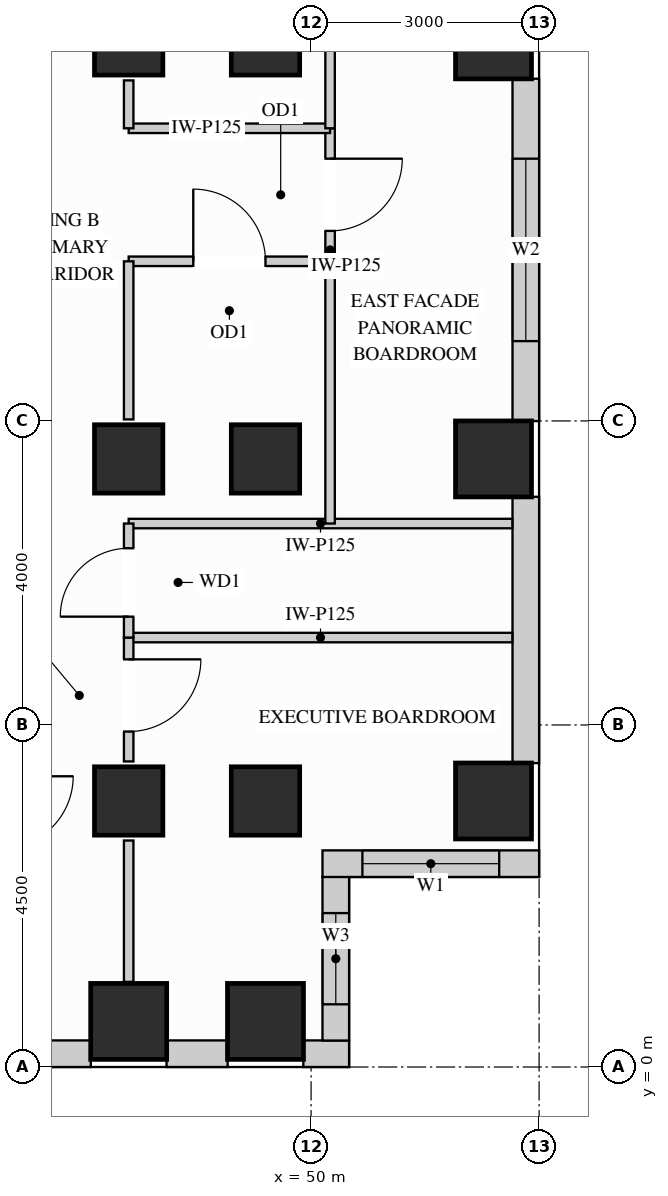
"""IFC4 building model, lengths in metres.
Left out: names, types, materials, properties, quantities, classifications, styles, units other than length and angle.
Written with IfcOpenShell. Run it as: python <this file> out.ifc"""

import sys

from ifc_helpers import new_model, si_unit, direction, frame, frame_2d, origin, origin_2d, place, context, subcontext, project, spatial, rectangle, extrude, source, transform, mapped, element, fill, save


model = new_model("IFC4")
c1 = context("Model", 3, precision=1e-05, world=origin(), true_north=direction((0.0, 1.0)))
c2 = subcontext(c1, "Body", "Model", "MODEL_VIEW")
j1 = project(units=[si_unit("LENGTHUNIT", "METRE"), si_unit("PLANEANGLEUNIT", "RADIAN")], contexts=[c1])
p1 = place(None, origin())
s1 = spatial("IfcSite", under=j1, at=p1, CompositionType="ELEMENT")
p2 = place(p1, origin())
s2 = spatial("IfcBuilding", under=s1, at=p2, CompositionType="ELEMENT")
p3 = place(p2, frame((0.0, 0.0, 171.9)))
s3 = spatial("IfcBuildingStorey", under=s2, at=p3, CompositionType="ELEMENT", Elevation=171.9)
m1 = source(origin(), c2, "Body", "SweptSolid", [
    extrude(rectangle(XDim=0.9, YDim=0.9, at=origin_2d()), origin(), (0.0, 0.0, 1.0), 3.4),
])
for number, where, z_axis, x_axis in (
    (1, (47.6, 13.5, 0.0), (0.0, 0.0, 1.0), (1.0, 0.0, 0.0)),
    (2, (47.6, 3.5, 0.0), (0.0, 0.0, 1.0), (1.0, 0.0, 0.0)),
    (3, (47.6, 8.0, 0.0), (0.0, 0.0, 1.0), (1.0, 0.0, 0.0)),
    (4, (49.4, 13.5, 0.0), (0.0, 0.0, 1.0), (1.0, 0.0, 0.0)),
    (5, (49.4, 3.5, 0.0), (0.0, 0.0, 1.0), (1.0, 0.0, 0.0)),
    (6, (49.4, 8.0, 0.0), (0.0, 0.0, 1.0), (1.0, 0.0, 0.0)),
):
    element("IfcColumn", number, at=place(p3, frame(where, z_axis=z_axis, x_axis=x_axis)), inside=s3, PredefinedType="COLUMN", context=c2, shape_type="MappedRepresentation", body=[
        mapped(m1, transform((0.0, 0.0, 0.0), x_axis=(1.0, 0.0, 0.0), y_axis=(0.0, 1.0, 0.0), z_axis=(0.0, 0.0, 1.0))),
    ])
m2 = source(origin(), c2, "Body", "SweptSolid", [
    extrude(rectangle(XDim=1.0, YDim=1.0, at=origin_2d()), origin(), (0.0, 0.0, 1.0), 3.4),
])
for number, where, z_axis, x_axis in (
    (7, (52.4, 13.5, 0.0), (0.0, 0.0, 1.0), (1.0, 0.0, 0.0)),
    (8, (52.4, 3.5, 0.0), (0.0, 0.0, 1.0), (1.0, 0.0, 0.0)),
    (9, (52.4, 8.0, 0.0), (0.0, 0.0, 1.0), (1.0, 0.0, 0.0)),
    (10, (47.6, 0.6, 0.0), (0.0, 0.0, 1.0), (1.0, 0.0, 0.0)),
    (11, (49.4, 0.6, 0.0), (0.0, 0.0, 1.0), (1.0, 0.0, 0.0)),
):
    element("IfcColumn", number, at=place(p3, frame(where, z_axis=z_axis, x_axis=x_axis)), inside=s3, PredefinedType="COLUMN", context=c2, shape_type="MappedRepresentation", body=[
        mapped(m2, transform((0.0, 0.0, 0.0), x_axis=(1.0, 0.0, 0.0), y_axis=(0.0, 1.0, 0.0), z_axis=(0.0, 0.0, 1.0))),
    ])
p4 = place(p3, frame((40.498, 0.175, 0.0), z_axis=(0.0, 0.0, 1.0), x_axis=(1.0, 0.0, 0.0)))
e12 = element("IfcWall", 12, at=p4, inside=s3, PredefinedType="SOLIDWALL", context=c2, shape_type="SweptSolid", body=[
    extrude(rectangle(XDim=6.604, YDim=0.35, at=frame_2d((3.302, 0.0))), origin(), (0.0, 0.0, 1.0), 2.612),
])
p5 = place(p4, frame((0.737, 0.0, 0.78)))
e13 = element("IfcOpeningElement", 13, at=p5, cuts=e12, PredefinedType="OPENING", context=c2, shape_type="SweptSolid", body=[
    extrude(rectangle(XDim=1.8, YDim=1.652, at=frame_2d((0.9, 0.826))), frame((0.0, 0.185, 0.0), z_axis=(0.0, -1.0, 0.0), x_axis=(1.0, 0.0, 0.0)), (0.0, 0.0, 1.0), 0.37),
])
p6 = place(p4, frame((2.955, 0.0, 0.78)))
e14 = element("IfcOpeningElement", 14, at=p6, cuts=e12, PredefinedType="OPENING", context=c2, shape_type="SweptSolid", body=[
    extrude(rectangle(XDim=1.8, YDim=1.652, at=frame_2d((0.9, 0.826))), frame((0.0, 0.185, 0.0), z_axis=(0.0, -1.0, 0.0), x_axis=(1.0, 0.0, 0.0)), (0.0, 0.0, 1.0), 0.37),
])
m3 = source(origin(), c2, "Body", "SweptSolid", [
    extrude(rectangle(XDim=0.804, YDim=0.35, at=frame_2d((0.402, 0.0))), origin(), (0.0, 0.0, 1.0), 3.385),
])
p7 = place(p3, frame((48.098, 0.175, 0.0), z_axis=(0.0, 0.0, 1.0), x_axis=(1.0, 0.0, 0.0)))
e15 = element("IfcWall", 15, at=p7, inside=s3, PredefinedType="SOLIDWALL", context=c2, shape_type="MappedRepresentation", body=[
    mapped(m3, transform((0.0, 0.0, 0.0), x_axis=(1.0, 0.0, 0.0), y_axis=(0.0, 1.0, 0.0), z_axis=(0.0, 0.0, 1.0))),
])
m4 = source(origin(), c2, "Body", "SweptSolid", [
    extrude(rectangle(XDim=0.602, YDim=0.35, at=frame_2d((0.301, 0.0))), origin(), (0.0, 0.0, 1.0), 3.385),
])
p8 = place(p3, frame((49.898, 0.175, 0.0), z_axis=(0.0, 0.0, 1.0), x_axis=(1.0, 0.0, 0.0)))
e16 = element("IfcWall", 16, at=p8, inside=s3, PredefinedType="SOLIDWALL", context=c2, shape_type="MappedRepresentation", body=[
    mapped(m4, transform((0.0, 0.0, 0.0), x_axis=(1.0, 0.0, 0.0), y_axis=(0.0, 1.0, 0.0), z_axis=(0.0, 0.0, 1.0))),
])
p9 = place(p3, frame((50.325, 0.348, 0.0), z_axis=(0.0, 0.0, 1.0), x_axis=(0.0, 1.0, 0.0)))
e17 = element("IfcWall", 17, at=p9, inside=s3, PredefinedType="SOLIDWALL", context=c2, shape_type="SweptSolid", body=[
    extrude(rectangle(XDim=2.154, YDim=0.35, at=frame_2d((1.077, 0.0))), origin(), (0.0, 0.0, 1.0), 3.385),
])
p10 = place(p9, frame((0.477, 0.0, 0.78)))
e18 = element("IfcOpeningElement", 18, at=p10, cuts=e17, PredefinedType="OPENING", context=c2, shape_type="SweptSolid", body=[
    extrude(rectangle(XDim=1.2, YDim=2.1, at=frame_2d((0.6, 1.05))), frame((0.0, 0.185, 0.0), z_axis=(0.0, -1.0, 0.0), x_axis=(1.0, 0.0, 0.0)), (0.0, 0.0, 1.0), 0.37),
])
p11 = place(p3, frame((50.15, 2.675, 0.0), z_axis=(0.0, 0.0, 1.0), x_axis=(1.0, 0.0, 0.0)))
e19 = element("IfcWall", 19, at=p11, inside=s3, PredefinedType="SOLIDWALL", context=c2, shape_type="SweptSolid", body=[
    extrude(rectangle(XDim=2.85, YDim=0.35, at=frame_2d((1.425, 0.0))), origin(), (0.0, 0.0, 1.0), 3.385),
])
p12 = place(p11, frame((0.525, 0.0, 0.78)))
e20 = element("IfcOpeningElement", 20, at=p12, cuts=e19, PredefinedType="OPENING", context=c2, shape_type="SweptSolid", body=[
    extrude(rectangle(XDim=1.8, YDim=2.1, at=frame_2d((0.9, 1.05))), frame((0.0, 0.185, 0.0), z_axis=(0.0, -1.0, 0.0), x_axis=(1.0, 0.0, 0.0)), (0.0, 0.0, 1.0), 0.37),
])
m5 = source(origin(), c2, "Body", "SweptSolid", [
    extrude(rectangle(XDim=3.504, YDim=0.35, at=frame_2d((1.752, 0.0))), origin(), (0.0, 0.0, 1.0), 2.612),
])
p13 = place(p3, frame((52.825, 3.998, 0.0), z_axis=(0.0, 0.0, 1.0), x_axis=(0.0, 1.0, 0.0)))
e21 = element("IfcWall", 21, at=p13, inside=s3, PredefinedType="SOLIDWALL", context=c2, shape_type="MappedRepresentation", body=[
    mapped(m5, transform((0.0, 0.0, 0.0), x_axis=(1.0, 0.0, 0.0), y_axis=(0.0, 1.0, 0.0), z_axis=(0.0, 0.0, 1.0))),
])
p14 = place(p3, frame((52.825, 8.498, 0.0), z_axis=(0.0, 0.0, 1.0), x_axis=(0.0, 1.0, 0.0)))
e22 = element("IfcWall", 22, at=p14, inside=s3, PredefinedType="SOLIDWALL", context=c2, shape_type="SweptSolid", body=[
    extrude(rectangle(XDim=4.504, YDim=0.35, at=frame_2d((2.252, 0.0))), origin(), (0.0, 0.0, 1.0), 2.612),
])
p15 = place(p14, frame((1.052, 0.0, 0.78)))
e23 = element("IfcOpeningElement", 23, at=p15, cuts=e22, PredefinedType="OPENING", context=c2, shape_type="SweptSolid", body=[
    extrude(rectangle(XDim=2.4, YDim=1.652, at=frame_2d((1.2, 0.826))), frame((0.0, 0.185, 0.0), z_axis=(0.0, -1.0, 0.0), x_axis=(1.0, 0.0, 0.0)), (0.0, 0.0, 1.0), 0.37),
])
p16 = place(p3, frame((50.25, 10.6, 0.0), z_axis=(0.0, 0.0, 1.0), x_axis=(0.0, 1.0, 0.0)))
e24 = element("IfcWall", 24, at=p16, inside=s3, PredefinedType="PARTITIONING", context=c2, shape_type="SweptSolid", body=[
    extrude(rectangle(XDim=1.75, YDim=0.125, at=frame_2d((0.875, 0.0))), origin(), (0.0, 0.0, 1.0), 3.385),
])
p17 = place(p16, frame((0.4, 0.0, 0.0)))
e25 = element("IfcOpeningElement", 25, at=p17, cuts=e24, PredefinedType="OPENING", context=c2, shape_type="SweptSolid", body=[
    extrude(rectangle(XDim=0.95, YDim=2.15, at=frame_2d((0.475, 1.075))), frame((0.0, 0.073, 0.0), z_axis=(0.0, -1.0, 0.0), x_axis=(1.0, 0.0, 0.0)), (0.0, 0.0, 1.0), 0.145),
])
m6 = source(origin(), c2, "Body", "SweptSolid", [
    extrude(rectangle(XDim=5.048, YDim=0.125, at=frame_2d((2.524, 0.0))), origin(), (0.0, 0.0, 1.0), 3.385),
])
for number, where, z_axis, x_axis in (
    (26, (47.6, 5.65, 0.0), (0.0, 0.0, 1.0), (1.0, 0.0, 0.0)),
    (27, (47.6, 7.15, 0.0), (0.0, 0.0, 1.0), (1.0, 0.0, 0.0)),
):
    element("IfcWall", number, at=place(p3, frame(where, z_axis=z_axis, x_axis=x_axis)), inside=s3, PredefinedType="PARTITIONING", context=c2, shape_type="MappedRepresentation", body=[
        mapped(m6, transform((0.0, 0.0, 0.0), x_axis=(1.0, 0.0, 0.0), y_axis=(0.0, 1.0, 0.0), z_axis=(0.0, 0.0, 1.0))),
    ])
m7 = source(origin(), c2, "Body", "SweptSolid", [
    extrude(rectangle(XDim=2.65, YDim=0.125, at=frame_2d((1.325, 0.0))), origin(), (0.0, 0.0, 1.0), 3.385),
])
p18 = place(p3, frame((47.6, 12.35, 0.0), z_axis=(0.0, 0.0, 1.0), x_axis=(1.0, 0.0, 0.0)))
e28 = element("IfcWall", 28, at=p18, inside=s3, PredefinedType="PARTITIONING", context=c2, shape_type="MappedRepresentation", body=[
    mapped(m7, transform((0.0, 0.0, 0.0), x_axis=(1.0, 0.0, 0.0), y_axis=(0.0, 1.0, 0.0), z_axis=(0.0, 0.0, 1.0))),
])
p19 = place(p3, frame((47.6, 10.6, 0.0), z_axis=(0.0, 0.0, 1.0), x_axis=(1.0, 0.0, 0.0)))
e29 = element("IfcWall", 29, at=p19, inside=s3, PredefinedType="PARTITIONING", context=c2, shape_type="SweptSolid", body=[
    extrude(rectangle(XDim=2.65, YDim=0.125, at=frame_2d((1.325, 0.0))), origin(), (0.0, 0.0, 1.0), 2.773),
])
p20 = place(p19, frame((0.85, 0.0, 0.0)))
e30 = element("IfcOpeningElement", 30, at=p20, cuts=e29, PredefinedType="OPENING", context=c2, shape_type="SweptSolid", body=[
    extrude(rectangle(XDim=0.95, YDim=2.15, at=frame_2d((0.475, 1.075))), frame((0.0, 0.073, 0.0), z_axis=(0.0, -1.0, 0.0), x_axis=(1.0, 0.0, 0.0)), (0.0, 0.0, 1.0), 0.145),
])
m8 = source(origin(), c2, "Body", "SweptSolid", [
    extrude(rectangle(XDim=3.45, YDim=0.125, at=frame_2d((1.725, 0.0))), origin(), (0.0, 0.0, 1.0), 3.385),
])
p21 = place(p3, frame((50.25, 7.15, 0.0), z_axis=(0.0, 0.0, 1.0), x_axis=(0.0, 1.0, 0.0)))
e31 = element("IfcWall", 31, at=p21, inside=s3, PredefinedType="PARTITIONING", context=c2, shape_type="MappedRepresentation", body=[
    mapped(m8, transform((0.0, 0.0, 0.0), x_axis=(1.0, 0.0, 0.0), y_axis=(0.0, 1.0, 0.0), z_axis=(0.0, 0.0, 1.0))),
])
m9 = source(origin(), c2, "Body", "SweptSolid", [
    extrude(rectangle(XDim=2.798, YDim=0.125, at=frame_2d((1.399, 0.0))), origin(), (0.0, 0.0, 1.0), 3.385),
])
p22 = place(p3, frame((50.25, 12.35, 0.0), z_axis=(0.0, 0.0, 1.0), x_axis=(0.0, 1.0, 0.0)))
e32 = element("IfcWall", 32, at=p22, inside=s3, PredefinedType="PARTITIONING", context=c2, shape_type="MappedRepresentation", body=[
    mapped(m9, transform((0.0, 0.0, 0.0), x_axis=(1.0, 0.0, 0.0), y_axis=(0.0, 1.0, 0.0), z_axis=(0.0, 0.0, 1.0))),
])
p23 = place(p3, frame((47.6, 4.02, 0.0), z_axis=(0.0, 0.0, 1.0), x_axis=(0.0, 1.0, 0.0)))
e33 = element("IfcWall", 33, at=p23, inside=s3, PredefinedType="PARTITIONING", context=c2, shape_type="SweptSolid", body=[
    extrude(rectangle(XDim=1.63, YDim=0.125, at=frame_2d((0.815, 0.0))), origin(), (0.0, 0.0, 1.0), 2.773),
])
p24 = place(p23, frame((0.393, 0.0, 0.0)))
e34 = element("IfcOpeningElement", 34, at=p24, cuts=e33, PredefinedType="OPENING", context=c2, shape_type="SweptSolid", body=[
    extrude(rectangle(XDim=0.95, YDim=2.15, at=frame_2d((0.475, 1.075))), frame((0.0, 0.073, 0.0), z_axis=(0.0, -1.0, 0.0), x_axis=(1.0, 0.0, 0.0)), (0.0, 0.0, 1.0), 0.145),
])
m10 = source(origin(), c2, "Body", "SweptSolid", [
    extrude(rectangle(XDim=1.86, YDim=0.125, at=frame_2d((0.93, 0.0))), origin(), (0.0, 0.0, 1.0), 2.773),
])
p25 = place(p3, frame((47.6, 1.12, 0.0), z_axis=(0.0, 0.0, 1.0), x_axis=(0.0, 1.0, 0.0)))
e35 = element("IfcWall", 35, at=p25, inside=s3, PredefinedType="PARTITIONING", context=c2, shape_type="MappedRepresentation", body=[
    mapped(m10, transform((0.0, 0.0, 0.0), x_axis=(1.0, 0.0, 0.0), y_axis=(0.0, 1.0, 0.0), z_axis=(0.0, 0.0, 1.0))),
])
m11 = source(origin(), c2, "Body", "SweptSolid", [
    extrude(rectangle(XDim=2.08, YDim=0.125, at=frame_2d((1.04, 0.0))), origin(), (0.0, 0.0, 1.0), 2.773),
])
p26 = place(p3, frame((47.6, 8.52, 0.0), z_axis=(0.0, 0.0, 1.0), x_axis=(0.0, 1.0, 0.0)))
e36 = element("IfcWall", 36, at=p26, inside=s3, PredefinedType="PARTITIONING", context=c2, shape_type="MappedRepresentation", body=[
    mapped(m11, transform((0.0, 0.0, 0.0), x_axis=(1.0, 0.0, 0.0), y_axis=(0.0, 1.0, 0.0), z_axis=(0.0, 0.0, 1.0))),
])
m12 = source(origin(), c2, "Body", "SweptSolid", [
    extrude(rectangle(XDim=0.63, YDim=0.125, at=frame_2d((0.315, 0.0))), origin(), (0.0, 0.0, 1.0), 2.773),
])
p27 = place(p3, frame((47.6, 12.35, 0.0), z_axis=(0.0, 0.0, 1.0), x_axis=(0.0, 1.0, 0.0)))
e37 = element("IfcWall", 37, at=p27, inside=s3, PredefinedType="PARTITIONING", context=c2, shape_type="MappedRepresentation", body=[
    mapped(m12, transform((0.0, 0.0, 0.0), x_axis=(1.0, 0.0, 0.0), y_axis=(0.0, 1.0, 0.0), z_axis=(0.0, 0.0, 1.0))),
])
p28 = place(p3, frame((47.6, 5.65, 0.0), z_axis=(0.0, 0.0, 1.0), x_axis=(0.0, 1.0, 0.0)))
e38 = element("IfcWall", 38, at=p28, inside=s3, PredefinedType="PARTITIONING", context=c2, shape_type="SweptSolid", body=[
    extrude(rectangle(XDim=1.5, YDim=0.125, at=frame_2d((0.75, 0.0))), origin(), (0.0, 0.0, 1.0), 2.773),
])
p29 = place(p28, frame((0.275, 0.0, 0.0)))
e39 = element("IfcOpeningElement", 39, at=p29, cuts=e38, PredefinedType="OPENING", context=c2, shape_type="SweptSolid", body=[
    extrude(rectangle(XDim=0.9, YDim=2.15, at=frame_2d((0.45, 1.075))), frame((0.0, 0.073, 0.0), z_axis=(0.0, -1.0, 0.0), x_axis=(1.0, 0.0, 0.0)), (0.0, 0.0, 1.0), 0.145),
])
m13 = source(origin(), c2, "Body", "SweptSolid", [
    extrude(rectangle(XDim=0.95, YDim=2.15, at=frame_2d((0.475, 1.075))), frame((0.0, 0.025, 0.0), z_axis=(0.0, -1.0, 0.0), x_axis=(1.0, 0.0, 0.0)), (0.0, 0.0, 1.0), 0.05),
])
p30 = place(p24, origin())
e40 = element("IfcDoor", 40, at=p30, inside=s3, OperationType="SINGLE_SWING_RIGHT", PredefinedType="DOOR", context=c2, shape_type="MappedRepresentation", body=[
    mapped(m13, transform((0.0, 0.0, 0.0), x_axis=(1.0, 0.0, 0.0), y_axis=(0.0, 1.0, 0.0), z_axis=(0.0, 0.0, 1.0))),
])
fill(e34, e40)
p31 = place(p20, origin())
e41 = element("IfcDoor", 41, at=p31, inside=s3, OperationType="SINGLE_SWING_LEFT", PredefinedType="DOOR", context=c2, shape_type="MappedRepresentation", body=[
    mapped(m13, transform((0.0, 0.0, 0.0), x_axis=(1.0, 0.0, 0.0), y_axis=(0.0, 1.0, 0.0), z_axis=(0.0, 0.0, 1.0))),
])
fill(e30, e41)
p32 = place(p17, origin())
e42 = element("IfcDoor", 42, at=p32, inside=s3, OperationType="SINGLE_SWING_RIGHT", PredefinedType="DOOR", context=c2, shape_type="MappedRepresentation", body=[
    mapped(m13, transform((0.0, 0.0, 0.0), x_axis=(1.0, 0.0, 0.0), y_axis=(0.0, 1.0, 0.0), z_axis=(0.0, 0.0, 1.0))),
])
fill(e25, e42)
m14 = source(origin(), c2, "Body", "SweptSolid", [
    extrude(rectangle(XDim=0.9, YDim=2.15, at=frame_2d((0.45, 1.075))), frame((0.0, 0.025, 0.0), z_axis=(0.0, -1.0, 0.0), x_axis=(1.0, 0.0, 0.0)), (0.0, 0.0, 1.0), 0.05),
])
p33 = place(p29, origin())
e43 = element("IfcDoor", 43, at=p33, inside=s3, OperationType="SINGLE_SWING_LEFT", PredefinedType="DOOR", context=c2, shape_type="MappedRepresentation", body=[
    mapped(m14, transform((0.0, 0.0, 0.0), x_axis=(1.0, 0.0, 0.0), y_axis=(0.0, 1.0, 0.0), z_axis=(0.0, 0.0, 1.0))),
])
fill(e39, e43)
m15 = source(origin(), c2, "Body", "SweptSolid", [
    extrude(rectangle(XDim=1.8, YDim=2.1, at=frame_2d((0.9, 1.05))), frame((0.0, 0.03, 0.0), z_axis=(0.0, -1.0, 0.0), x_axis=(1.0, 0.0, 0.0)), (0.0, 0.0, 1.0), 0.06),
])
p34 = place(p12, origin())
e44 = element("IfcWindow", 44, at=p34, inside=s3, PartitioningType="SINGLE_PANEL", PredefinedType="WINDOW", context=c2, shape_type="MappedRepresentation", body=[
    mapped(m15, transform((0.0, 0.0, 0.0), x_axis=(1.0, 0.0, 0.0), y_axis=(0.0, 1.0, 0.0), z_axis=(0.0, 0.0, 1.0))),
])
fill(e20, e44)
m16 = source(origin(), c2, "Body", "SweptSolid", [
    extrude(rectangle(XDim=2.4, YDim=1.652, at=frame_2d((1.2, 0.826))), frame((0.0, 0.03, 0.0), z_axis=(0.0, -1.0, 0.0), x_axis=(1.0, 0.0, 0.0)), (0.0, 0.0, 1.0), 0.06),
])
p35 = place(p15, origin())
e45 = element("IfcWindow", 45, at=p35, inside=s3, PartitioningType="SINGLE_PANEL", PredefinedType="WINDOW", context=c2, shape_type="MappedRepresentation", body=[
    mapped(m16, transform((0.0, 0.0, 0.0), x_axis=(1.0, 0.0, 0.0), y_axis=(0.0, 1.0, 0.0), z_axis=(0.0, 0.0, 1.0))),
])
fill(e23, e45)
m17 = source(origin(), c2, "Body", "SweptSolid", [
    extrude(rectangle(XDim=1.2, YDim=2.1, at=frame_2d((0.6, 1.05))), frame((0.0, 0.03, 0.0), z_axis=(0.0, -1.0, 0.0), x_axis=(1.0, 0.0, 0.0)), (0.0, 0.0, 1.0), 0.06),
])
p36 = place(p10, origin())
e46 = element("IfcWindow", 46, at=p36, inside=s3, PartitioningType="SINGLE_PANEL", PredefinedType="WINDOW", context=c2, shape_type="MappedRepresentation", body=[
    mapped(m17, transform((0.0, 0.0, 0.0), x_axis=(1.0, 0.0, 0.0), y_axis=(0.0, 1.0, 0.0), z_axis=(0.0, 0.0, 1.0))),
])
fill(e18, e46)
save(model, sys.argv[1])
